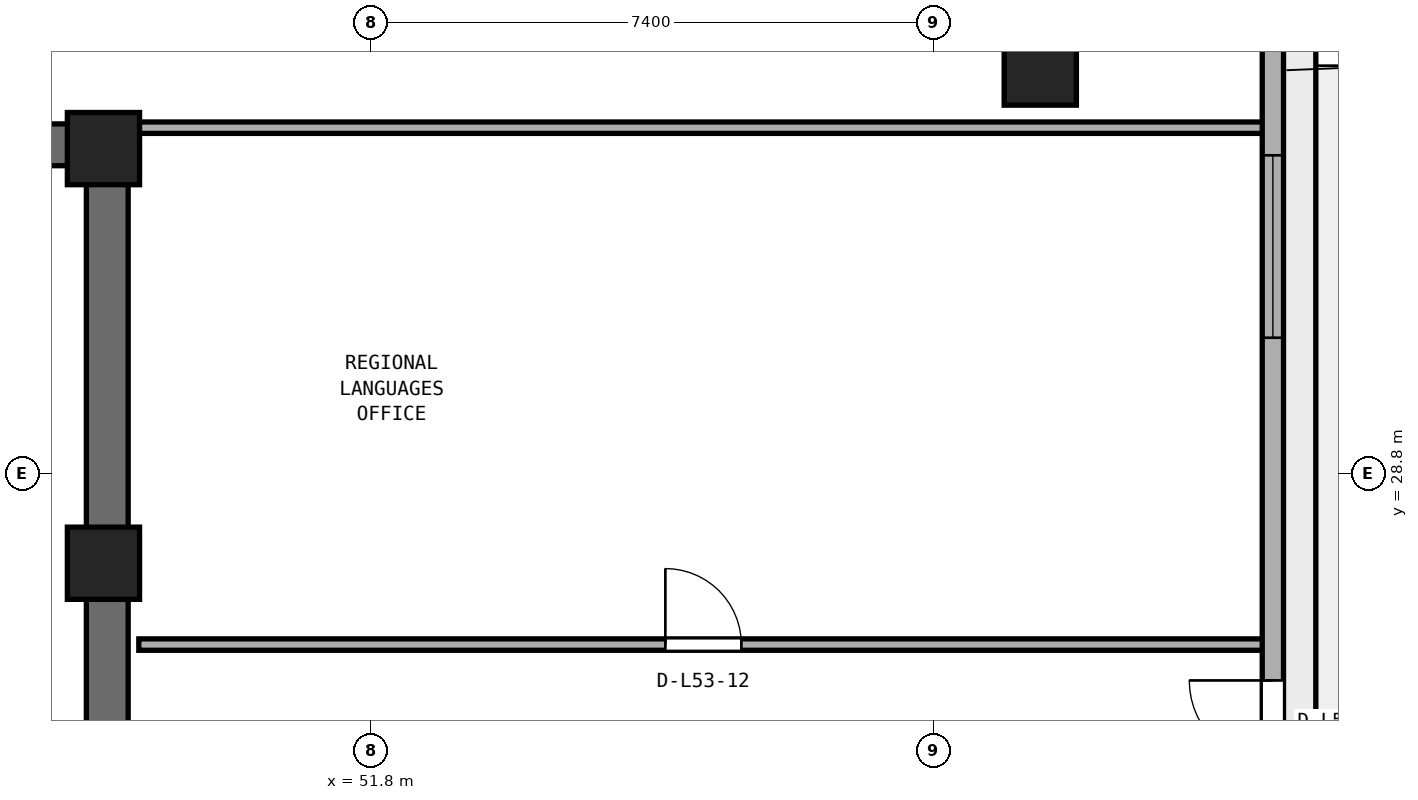
"""IFC4 building model, lengths in metres.
Left out: names, types, materials, properties, quantities, classifications, styles, units other than length and angle.
Written with IfcOpenShell. Run it as: python <this file> out.ifc"""

import sys

from ifc_helpers import new_model, si_unit, direction, frame, frame_2d, origin, origin_2d, place, context, subcontext, project, spatial, rectangle, extrude, element, fill, save


model = new_model("IFC4")
c1 = context("Model", 3, precision=1e-05, world=origin(), true_north=direction((0.0, 1.0)))
c2 = subcontext(c1, "Body", "Model", "MODEL_VIEW")
j1 = project(units=[si_unit("LENGTHUNIT", "METRE"), si_unit("PLANEANGLEUNIT", "RADIAN")], contexts=[c1])
p1 = place(None, origin())
s1 = spatial("IfcSite", under=j1, at=p1, CompositionType="ELEMENT")
p2 = place(p1, origin())
s2 = spatial("IfcBuilding", under=s1, at=p2, CompositionType="ELEMENT")
p3 = place(p2, frame((0.0, 0.0, 208.6)))
s3 = spatial("IfcBuildingStorey", under=s2, at=p3, CompositionType="ELEMENT", Elevation=208.6)
p4 = place(p3, frame((25.4, 33.125, 0.0), z_axis=(0.0, 0.0, 1.0), x_axis=(1.0, 0.0, 0.0)))
e1 = element("IfcWall", 1, at=p4, inside=s3, PredefinedType="SHEAR", context=c2, shape_type="SweptSolid", body=[
    extrude(rectangle(XDim=23.2, YDim=0.55, at=frame_2d((11.6, 0.0))), origin(), (0.0, 0.0, 1.0), 3.54),
])
p5 = place(p3, frame((48.325, 17.55, 0.0), z_axis=(0.0, 0.0, 1.0), x_axis=(0.0, 1.0, 0.0)))
e2 = element("IfcWall", 2, at=p5, inside=s3, PredefinedType="SHEAR", context=c2, shape_type="SweptSolid", body=[
    extrude(rectangle(XDim=15.3, YDim=0.55, at=frame_2d((7.65, 0.0))), origin(), (0.0, 0.0, 1.0), 3.54),
])
p6 = place(p5, frame((5.75, 0.0, 0.0)))
e3 = element("IfcOpeningElement", 3, at=p6, cuts=e2, PredefinedType="OPENING", context=c2, shape_type="SweptSolid", body=[
    extrude(rectangle(XDim=1.5, YDim=2.15, at=frame_2d((0.75, 1.075))), frame((0.0, 0.285, 0.0), z_axis=(0.0, -1.0, 0.0), x_axis=(1.0, 0.0, 0.0)), (0.0, 0.0, 1.0), 0.57),
])
for number, where, z_axis, x_axis in (
    (4, (48.275, 27.62, 0.0), (0.0, 0.0, 1.0), (1.0, 0.0, 0.0)),
    (5, (48.275, 33.075, 0.0), (0.0, 0.0, 1.0), (1.0, 0.0, 0.0)),
):
    element("IfcColumn", number, at=place(p3, frame(where, z_axis=z_axis, x_axis=x_axis)), inside=s3, PredefinedType="PILASTER", context=c2, shape_type="SweptSolid", body=[
        extrude(rectangle(XDim=0.95, YDim=0.95, at=origin_2d()), origin(), (0.0, 0.0, 1.0), 3.8),
    ])
p7 = place(p3, frame((60.6, 34.122, 0.0), z_axis=(0.0, 0.0, 1.0), x_axis=(1.0, 0.0, 0.0)))
e6 = element("IfcColumn", 6, at=p7, inside=s3, PredefinedType="COLUMN", context=c2, shape_type="SweptSolid", body=[
    extrude(rectangle(XDim=0.95, YDim=0.95, at=origin_2d()), origin(), (0.0, 0.0, 1.0), 3.8),
])
p8 = place(p3, frame((48.74, 26.55, 0.0), z_axis=(0.0, 0.0, 1.0), x_axis=(1.0, 0.0, 0.0)))
e7 = element("IfcWall", 7, at=p8, inside=s3, PredefinedType="PARTITIONING", context=c2, shape_type="SweptSolid", body=[
    extrude(rectangle(XDim=14.855, YDim=0.15, at=frame_2d((7.427, 0.0))), origin(), (0.0, 0.0, 1.0), 3.54),
])
p9 = place(p8, frame((6.927, 0.0, 0.0)))
e8 = element("IfcOpeningElement", 8, at=p9, cuts=e7, PredefinedType="OPENING", context=c2, shape_type="SweptSolid", body=[
    extrude(rectangle(XDim=1.0, YDim=2.12, at=frame_2d((0.5, 1.06))), frame((0.0, 0.085, 0.0), z_axis=(0.0, -1.0, 0.0), x_axis=(1.0, 0.0, 0.0)), (0.0, 0.0, 1.0), 0.17),
])
p10 = place(p3, frame((48.74, 33.35, 0.0), z_axis=(0.0, 0.0, 1.0), x_axis=(1.0, 0.0, 0.0)))
e9 = element("IfcWall", 9, at=p10, inside=s3, PredefinedType="PARTITIONING", context=c2, shape_type="SweptSolid", body=[
    extrude(rectangle(XDim=14.855, YDim=0.15, at=frame_2d((7.427, 0.0))), origin(), (0.0, 0.0, 1.0), 2.923),
])
p11 = place(p3, frame((63.66, 16.39, 0.0), z_axis=(0.0, 0.0, 1.0), x_axis=(0.0, 1.0, 0.0)))
e10 = element("IfcWall", 10, at=p11, inside=s3, PredefinedType="STANDARD", context=c2, shape_type="SweptSolid", body=[
    extrude(rectangle(XDim=18.876, YDim=0.28, at=frame_2d((9.438, 0.0))), origin(), (0.0, 0.0, 1.0), 3.54),
])
p12 = place(p11, frame((8.588, 0.0, 0.0)))
e11 = element("IfcOpeningElement", 11, at=p12, cuts=e10, PredefinedType="OPENING", context=c2, shape_type="SweptSolid", body=[
    extrude(rectangle(XDim=1.1, YDim=2.2, at=frame_2d((0.55, 1.1))), frame((0.0, 0.15, 0.0), z_axis=(0.0, -1.0, 0.0), x_axis=(1.0, 0.0, 0.0)), (0.0, 0.0, 1.0), 0.3),
])
p13 = place(p11, frame((2.029, 0.0, 0.9)))
e12 = element("IfcOpeningElement", 12, at=p13, cuts=e10, PredefinedType="OPENING", context=c2, shape_type="SweptSolid", body=[
    extrude(rectangle(XDim=2.4, YDim=1.75, at=frame_2d((1.2, 0.875))), frame((0.0, 0.15, 0.0), z_axis=(0.0, -1.0, 0.0), x_axis=(1.0, 0.0, 0.0)), (0.0, 0.0, 1.0), 0.3),
])
p14 = place(p11, frame((14.197, 0.0, 0.9)))
e13 = element("IfcOpeningElement", 13, at=p14, cuts=e10, PredefinedType="OPENING", context=c2, shape_type="SweptSolid", body=[
    extrude(rectangle(XDim=2.4, YDim=1.75, at=frame_2d((1.2, 0.875))), frame((0.0, 0.15, 0.0), z_axis=(0.0, -1.0, 0.0), x_axis=(1.0, 0.0, 0.0)), (0.0, 0.0, 1.0), 0.3),
])
p15 = place(p9, origin())
e14 = element("IfcDoor", 14, at=p15, inside=s3, OperationType="SINGLE_SWING_LEFT", PredefinedType="DOOR", context=c2, shape_type="SweptSolid", body=[
    extrude(rectangle(XDim=1.0, YDim=2.12, at=frame_2d((0.5, 1.06))), frame((0.0, 0.025, 0.0), z_axis=(0.0, -1.0, 0.0), x_axis=(1.0, 0.0, 0.0)), (0.0, 0.0, 1.0), 0.05),
])
fill(e8, e14)
p16 = place(p12, origin())
e15 = element("IfcDoor", 15, at=p16, inside=s3, OperationType="SINGLE_SWING_RIGHT", PredefinedType="DOOR", context=c2, shape_type="SweptSolid", body=[
    extrude(rectangle(XDim=1.1, YDim=2.2, at=frame_2d((0.55, 1.1))), frame((0.0, 0.025, 0.0), z_axis=(0.0, -1.0, 0.0), x_axis=(1.0, 0.0, 0.0)), (0.0, 0.0, 1.0), 0.05),
])
fill(e11, e15)
p17 = place(p14, origin())
e16 = element("IfcWindow", 16, at=p17, inside=s3, PartitioningType="SINGLE_PANEL", PredefinedType="WINDOW", context=c2, shape_type="SweptSolid", body=[
    extrude(rectangle(XDim=2.4, YDim=1.75, at=frame_2d((1.2, 0.875))), frame((0.0, 0.03, 0.0), z_axis=(0.0, -1.0, 0.0), x_axis=(1.0, 0.0, 0.0)), (0.0, 0.0, 1.0), 0.06),
])
fill(e13, e16)
save(model, sys.argv[1])
